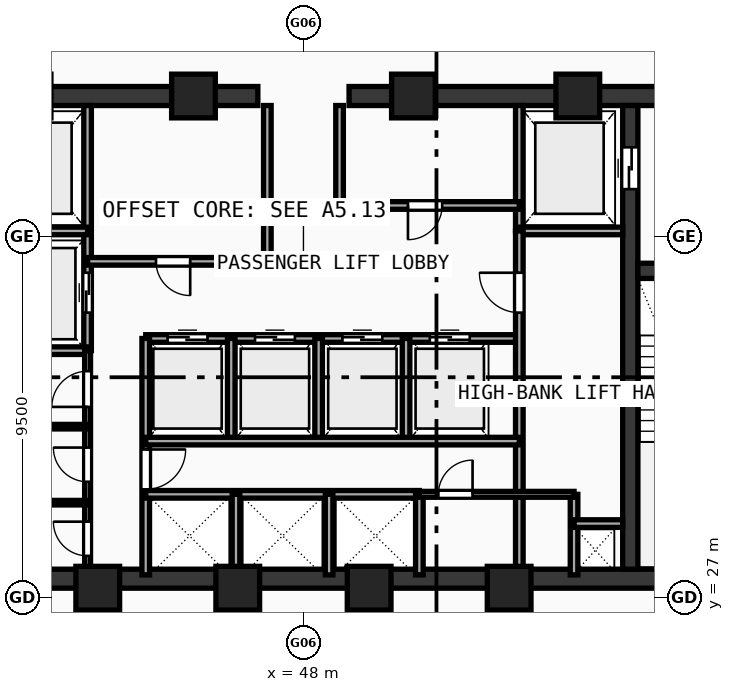
"""IFC4 building model, lengths in metres.
Left out: names, types, materials, properties, quantities, classifications, styles, units other than length and angle.
Written with IfcOpenShell. Run it as: python <this file> out.ifc"""

import sys

from ifc_helpers import new_model, si_unit, direction, frame, frame_2d, origin, origin_with_axes, origin_2d, place, context, subcontext, project, spatial, rectangle, hollow_rectangle, extrude, source, transform, mapped, element, fill, save


model = new_model("IFC4")
c1 = context("Model", 3, precision=1e-05, world=origin(), true_north=direction((0.0, 1.0)))
c2 = subcontext(c1, "Body", "Model", "MODEL_VIEW")
j1 = project(units=[si_unit("LENGTHUNIT", "METRE"), si_unit("PLANEANGLEUNIT", "RADIAN")], contexts=[c1])
p1 = place(None, origin())
s1 = spatial("IfcSite", under=j1, at=p1, CompositionType="ELEMENT")
p2 = place(p1, origin())
s2 = spatial("IfcBuilding", under=s1, at=p2, CompositionType="ELEMENT")
p3 = place(p2, frame((0.0, 0.0, 196.16)))
s3 = spatial("IfcBuildingStorey", under=s2, at=p3, CompositionType="ELEMENT", Elevation=196.16)
p4 = place(p3, frame((35.55, 27.5, 0.0), z_axis=(0.0, 0.0, 1.0), x_axis=(1.0, 0.0, 0.0)))
e1 = element("IfcWall", 1, at=p4, inside=s3, PredefinedType="SHEAR", context=c2, shape_type="SweptSolid", body=[
    extrude(rectangle(XDim=24.9, YDim=0.5, at=frame_2d((12.45, 0.0))), origin(), (0.0, 0.0, 1.0), 3.54),
])
p5 = place(p3, frame((35.55, 40.2, 0.0), z_axis=(0.0, 0.0, 1.0), x_axis=(1.0, 0.0, 0.0)))
e2 = element("IfcWall", 2, at=p5, inside=s3, PredefinedType="SHEAR", context=c2, shape_type="SweptSolid", body=[
    extrude(rectangle(XDim=11.25, YDim=0.5, at=frame_2d((5.625, 0.0))), origin(), (0.0, 0.0, 1.0), 3.54),
])
p6 = place(p5, frame((1.6, 0.0, 0.0)))
e3 = element("IfcOpeningElement", 3, at=p6, cuts=e2, PredefinedType="OPENING", context=c2, shape_type="SweptSolid", body=[
    extrude(rectangle(XDim=1.05, YDim=2.1, at=frame_2d((0.525, 1.05))), frame((0.0, 0.26, 0.0), z_axis=(0.0, -1.0, 0.0), x_axis=(1.0, 0.0, 0.0)), (0.0, 0.0, 1.0), 0.52),
])
p7 = place(p3, frame((49.2, 40.2, 0.0), z_axis=(0.0, 0.0, 1.0), x_axis=(1.0, 0.0, 0.0)))
e4 = element("IfcWall", 4, at=p7, inside=s3, PredefinedType="SHEAR", context=c2, shape_type="SweptSolid", body=[
    extrude(rectangle(XDim=11.25, YDim=0.5, at=frame_2d((5.625, 0.0))), origin(), (0.0, 0.0, 1.0), 3.54),
])
p8 = place(p7, frame((8.6, 0.0, 0.0)))
e5 = element("IfcOpeningElement", 5, at=p8, cuts=e4, PredefinedType="OPENING", context=c2, shape_type="SweptSolid", body=[
    extrude(rectangle(XDim=1.05, YDim=2.1, at=frame_2d((0.525, 1.05))), frame((0.0, 0.26, 0.0), z_axis=(0.0, -1.0, 0.0), x_axis=(1.0, 0.0, 0.0)), (0.0, 0.0, 1.0), 0.52),
])
p9 = place(p3, frame((56.6, 27.75, 0.0), z_axis=(0.0, 0.0, 1.0), x_axis=(0.0, 1.0, 0.0)))
e6 = element("IfcWall", 6, at=p9, inside=s3, PredefinedType="SHEAR", context=c2, shape_type="SweptSolid", body=[
    extrude(rectangle(XDim=12.2, YDim=0.4, at=frame_2d((6.1, 0.0))), origin(), (0.0, 0.0, 1.0), 3.54),
])
p10 = place(p9, frame((10.0, 0.0, 0.0)))
e7 = element("IfcOpeningElement", 7, at=p10, cuts=e6, PredefinedType="OPENING", context=c2, shape_type="SweptSolid", body=[
    extrude(rectangle(XDim=1.1, YDim=2.1, at=frame_2d((0.55, 1.05))), frame((0.0, 0.21, 0.0), z_axis=(0.0, -1.0, 0.0), x_axis=(1.0, 0.0, 0.0)), (0.0, 0.0, 1.0), 0.42),
])
p11 = place(p3, frame((56.8, 35.6, 0.0), z_axis=(0.0, 0.0, 1.0), x_axis=(1.0, 0.0, 0.0)))
e8 = element("IfcWall", 8, at=p11, inside=s3, PredefinedType="SHEAR", context=c2, shape_type="SweptSolid", body=[
    extrude(rectangle(XDim=3.15, YDim=0.4, at=frame_2d((1.575, 0.0))), origin(), (0.0, 0.0, 1.0), 3.54),
])
p12 = place(p11, frame((1.02, 0.0, 0.0)))
e9 = element("IfcOpeningElement", 9, at=p12, cuts=e8, PredefinedType="OPENING", context=c2, shape_type="SweptSolid", body=[
    extrude(rectangle(XDim=1.05, YDim=2.1, at=frame_2d((0.525, 1.05))), frame((0.0, 0.21, 0.0), z_axis=(0.0, -1.0, 0.0), x_axis=(1.0, 0.0, 0.0)), (0.0, 0.0, 1.0), 0.42),
])
m1 = source(origin(), c2, "Body", "SweptSolid", [
    extrude(hollow_rectangle(XDim=1.15, YDim=1.15, WallThickness=0.048, at=origin_2d()), origin(), (0.0, 0.0, 1.0), 3.8),
])
for number, where, z_axis, x_axis in (
    (10, (42.588, 27.25, -0.26), (0.0, 0.0, 1.0), (1.0, 0.0, 0.0)),
    (11, (46.272, 27.25, -0.26), (0.0, 0.0, 1.0), (1.0, 0.0, 0.0)),
    (12, (49.729, 27.25, -0.26), (0.0, 0.0, 1.0), (1.0, 0.0, 0.0)),
    (13, (53.412, 27.25, -0.26), (0.0, 0.0, 1.0), (1.0, 0.0, 0.0)),
    (14, (55.219, 40.2, -0.26), (0.0, 0.0, 1.0), (1.0, 0.0, 0.0)),
    (15, (50.894, 40.2, -0.26), (0.0, 0.0, 1.0), (1.0, 0.0, 0.0)),
    (16, (45.106, 40.2, -0.26), (0.0, 0.0, 1.0), (1.0, 0.0, 0.0)),
):
    element("IfcColumn", number, at=place(p3, frame(where, z_axis=z_axis, x_axis=x_axis)), inside=s3, PredefinedType="COLUMN", context=c2, shape_type="MappedRepresentation", body=[
        mapped(m1, transform((0.0, 0.0, 0.0), scale=1.0)),
    ])
p13 = place(p3, frame((42.32, 33.5, 0.0), z_axis=(0.0, 0.0, 1.0), x_axis=(0.0, 1.0, 0.0)))
e17 = element("IfcWall", 17, at=p13, inside=s3, PredefinedType="SOLIDWALL", context=c2, shape_type="SweptSolid", body=[
    extrude(rectangle(XDim=6.45, YDim=0.2, at=frame_2d((3.225, 0.0))), origin(), (0.0, 0.0, 1.0), 3.54),
])
p14 = place(p13, frame((1.0, 0.0, 0.0)))
e18 = element("IfcOpeningElement", 18, at=p14, cuts=e17, PredefinedType="OPENING", context=c2, shape_type="SweptSolid", body=[
    extrude(rectangle(XDim=1.05, YDim=2.1, at=frame_2d((0.525, 1.05))), frame((0.0, 0.11, 0.0), z_axis=(0.0, -1.0, 0.0), x_axis=(1.0, 0.0, 0.0)), (0.0, 0.0, 1.0), 0.22),
])
for number, where, z_axis, x_axis in (
    (19, (39.6, 36.65, 0.0), (0.0, 0.0, 1.0), (1.0, 0.0, 0.0)),
    (20, (39.6, 33.5, 0.0), (0.0, 0.0, 1.0), (1.0, 0.0, 0.0)),
):
    element("IfcWall", number, at=place(p3, frame(where, z_axis=z_axis, x_axis=x_axis)), inside=s3, PredefinedType="SOLIDWALL", context=c2, shape_type="SweptSolid", body=[
        extrude(rectangle(XDim=2.72, YDim=0.2, at=frame_2d((1.36, 0.0))), origin(), (0.0, 0.0, 1.0), 3.54),
    ])
p15 = place(p3, frame((53.68, 36.65, 0.0), z_axis=(0.0, 0.0, 1.0), x_axis=(0.0, 1.0, 0.0)))
e21 = element("IfcWall", 21, at=p15, inside=s3, PredefinedType="SOLIDWALL", context=c2, shape_type="SweptSolid", body=[
    extrude(rectangle(XDim=3.3, YDim=0.2, at=frame_2d((1.65, 0.0))), origin(), (0.0, 0.0, 1.0), 3.54),
])
p16 = place(p3, frame((53.68, 36.65, 0.0), z_axis=(0.0, 0.0, 1.0), x_axis=(1.0, 0.0, 0.0)))
e22 = element("IfcWall", 22, at=p16, inside=s3, PredefinedType="SOLIDWALL", context=c2, shape_type="SweptSolid", body=[
    extrude(rectangle(XDim=2.72, YDim=0.2, at=frame_2d((1.36, 0.0))), origin(), (0.0, 0.0, 1.0), 3.54),
])
p17 = place(p3, frame((42.32, 35.85, 0.0), z_axis=(0.0, 0.0, 1.0), x_axis=(1.0, 0.0, 0.0)))
e23 = element("IfcWall", 23, at=p17, inside=s3, PredefinedType="SOLIDWALL", context=c2, shape_type="SweptSolid", body=[
    extrude(rectangle(XDim=4.73, YDim=0.2, at=frame_2d((2.365, 0.0))), origin(), (0.0, 0.0, 1.0), 3.54),
])
p18 = place(p17, frame((1.8, 0.0, 0.0)))
e24 = element("IfcOpeningElement", 24, at=p18, cuts=e23, PredefinedType="OPENING", context=c2, shape_type="SweptSolid", body=[
    extrude(rectangle(XDim=0.9, YDim=2.1, at=frame_2d((0.45, 1.05))), frame((0.0, 0.11, 0.0), z_axis=(0.0, -1.0, 0.0), x_axis=(1.0, 0.0, 0.0)), (0.0, 0.0, 1.0), 0.22),
])
p19 = place(p3, frame((48.95, 37.32, 0.0), z_axis=(0.0, 0.0, 1.0), x_axis=(1.0, 0.0, 0.0)))
e25 = element("IfcWall", 25, at=p19, inside=s3, PredefinedType="SOLIDWALL", context=c2, shape_type="SweptSolid", body=[
    extrude(rectangle(XDim=4.73, YDim=0.2, at=frame_2d((2.365, 0.0))), origin(), (0.0, 0.0, 1.0), 3.54),
])
p20 = place(p19, frame((1.8, 0.0, 0.0)))
e26 = element("IfcOpeningElement", 26, at=p20, cuts=e25, PredefinedType="OPENING", context=c2, shape_type="SweptSolid", body=[
    extrude(rectangle(XDim=0.9, YDim=2.1, at=frame_2d((0.45, 1.05))), frame((0.0, 0.11, 0.0), z_axis=(0.0, -1.0, 0.0), x_axis=(1.0, 0.0, 0.0)), (0.0, 0.0, 1.0), 0.22),
])
p21 = place(p3, frame((47.05, 35.85, 0.0), z_axis=(0.0, 0.0, 1.0), x_axis=(0.0, 1.0, 0.0)))
e27 = element("IfcWall", 27, at=p21, inside=s3, PredefinedType="SOLIDWALL", context=c2, shape_type="SweptSolid", body=[
    extrude(rectangle(XDim=4.1, YDim=0.2, at=frame_2d((2.05, 0.0))), origin(), (0.0, 0.0, 1.0), 3.54),
])
p22 = place(p3, frame((48.95, 37.32, 0.0), z_axis=(0.0, 0.0, 1.0), x_axis=(0.0, 1.0, 0.0)))
e28 = element("IfcWall", 28, at=p22, inside=s3, PredefinedType="SOLIDWALL", context=c2, shape_type="SweptSolid", body=[
    extrude(rectangle(XDim=2.63, YDim=0.2, at=frame_2d((1.315, 0.0))), origin(), (0.0, 0.0, 1.0), 3.54),
])
p23 = place(p3, frame((43.85, 33.82, 0.0), z_axis=(0.0, 0.0, 1.0), x_axis=(1.0, 0.0, 0.0)))
e29 = element("IfcWall", 29, at=p23, inside=s3, PredefinedType="SOLIDWALL", context=c2, shape_type="SweptSolid", body=[
    extrude(rectangle(XDim=9.83, YDim=0.2, at=frame_2d((4.915, 0.0))), origin(), (0.0, 0.0, 1.0), 3.54),
])
p24 = place(p23, frame((0.575, 0.0, 0.0)))
e30 = element("IfcOpeningElement", 30, at=p24, cuts=e29, PredefinedType="OPENING", context=c2, shape_type="SweptSolid", body=[
    extrude(rectangle(XDim=1.05, YDim=2.1, at=frame_2d((0.525, 1.05))), frame((0.0, 0.11, 0.0), z_axis=(0.0, -1.0, 0.0), x_axis=(1.0, 0.0, 0.0)), (0.0, 0.0, 1.0), 0.22),
])
p25 = place(p23, frame((2.875, 0.0, 0.0)))
e31 = element("IfcOpeningElement", 31, at=p25, cuts=e29, PredefinedType="OPENING", context=c2, shape_type="SweptSolid", body=[
    extrude(rectangle(XDim=1.05, YDim=2.1, at=frame_2d((0.525, 1.05))), frame((0.0, 0.11, 0.0), z_axis=(0.0, -1.0, 0.0), x_axis=(1.0, 0.0, 0.0)), (0.0, 0.0, 1.0), 0.22),
])
p26 = place(p23, frame((5.175, 0.0, 0.0)))
e32 = element("IfcOpeningElement", 32, at=p26, cuts=e29, PredefinedType="OPENING", context=c2, shape_type="SweptSolid", body=[
    extrude(rectangle(XDim=1.05, YDim=2.1, at=frame_2d((0.525, 1.05))), frame((0.0, 0.11, 0.0), z_axis=(0.0, -1.0, 0.0), x_axis=(1.0, 0.0, 0.0)), (0.0, 0.0, 1.0), 0.22),
])
p27 = place(p23, frame((7.475, 0.0, 0.0)))
e33 = element("IfcOpeningElement", 33, at=p27, cuts=e29, PredefinedType="OPENING", context=c2, shape_type="SweptSolid", body=[
    extrude(rectangle(XDim=1.05, YDim=2.1, at=frame_2d((0.525, 1.05))), frame((0.0, 0.11, 0.0), z_axis=(0.0, -1.0, 0.0), x_axis=(1.0, 0.0, 0.0)), (0.0, 0.0, 1.0), 0.22),
])
p28 = place(p3, frame((43.85, 27.6, 0.0), z_axis=(0.0, 0.0, 1.0), x_axis=(0.0, 1.0, 0.0)))
e34 = element("IfcWall", 34, at=p28, inside=s3, PredefinedType="SOLIDWALL", context=c2, shape_type="SweptSolid", body=[
    extrude(rectangle(XDim=6.22, YDim=0.2, at=frame_2d((3.11, 0.0))), origin(), (0.0, 0.0, 1.0), 3.54),
])
p29 = place(p28, frame((2.25, 0.0, 0.0)))
e35 = element("IfcOpeningElement", 35, at=p29, cuts=e34, PredefinedType="OPENING", context=c2, shape_type="SweptSolid", body=[
    extrude(rectangle(XDim=1.05, YDim=2.1, at=frame_2d((0.525, 1.05))), frame((0.0, 0.11, 0.0), z_axis=(0.0, -1.0, 0.0), x_axis=(1.0, 0.0, 0.0)), (0.0, 0.0, 1.0), 0.22),
])
p30 = place(p3, frame((53.68, 27.6, 0.0), z_axis=(0.0, 0.0, 1.0), x_axis=(0.0, 1.0, 0.0)))
e36 = element("IfcWall", 36, at=p30, inside=s3, PredefinedType="SOLIDWALL", context=c2, shape_type="SweptSolid", body=[
    extrude(rectangle(XDim=9.05, YDim=0.2, at=frame_2d((4.525, 0.0))), origin(), (0.0, 0.0, 1.0), 3.54),
])
p31 = place(p30, frame((6.9, 0.0, 0.0)))
e37 = element("IfcOpeningElement", 37, at=p31, cuts=e36, PredefinedType="OPENING", context=c2, shape_type="SweptSolid", body=[
    extrude(rectangle(XDim=1.05, YDim=2.1, at=frame_2d((0.525, 1.05))), frame((0.0, 0.11, 0.0), z_axis=(0.0, -1.0, 0.0), x_axis=(1.0, 0.0, 0.0)), (0.0, 0.0, 1.0), 0.22),
])
for number, where, z_axis, x_axis in (
    (38, (46.1, 31.12, 0.0), (0.0, 0.0, 1.0), (0.0, 1.0, 0.0)),
    (39, (48.4, 31.12, 0.0), (0.0, 0.0, 1.0), (0.0, 1.0, 0.0)),
    (40, (50.7, 31.12, 0.0), (0.0, 0.0, 1.0), (0.0, 1.0, 0.0)),
):
    element("IfcWall", number, at=place(p3, frame(where, z_axis=z_axis, x_axis=x_axis)), inside=s3, PredefinedType="SOLIDWALL", context=c2, shape_type="SweptSolid", body=[
        extrude(rectangle(XDim=2.7, YDim=0.2, at=frame_2d((1.35, 0.0))), origin(), (0.0, 0.0, 1.0), 3.54),
    ])
p32 = place(p3, frame((43.85, 29.72, 0.0), z_axis=(0.0, 0.0, 1.0), x_axis=(1.0, 0.0, 0.0)))
e41 = element("IfcWall", 41, at=p32, inside=s3, PredefinedType="SOLIDWALL", context=c2, shape_type="SweptSolid", body=[
    extrude(rectangle(XDim=7.2, YDim=0.2, at=frame_2d((3.6, 0.0))), origin(), (0.0, 0.0, 1.0), 3.54),
])
p33 = place(p3, frame((51.05, 27.6, 0.0), z_axis=(0.0, 0.0, 1.0), x_axis=(0.0, 1.0, 0.0)))
e42 = element("IfcWall", 42, at=p33, inside=s3, PredefinedType="SOLIDWALL", context=c2, shape_type="SweptSolid", body=[
    extrude(rectangle(XDim=2.12, YDim=0.2, at=frame_2d((1.06, 0.0))), origin(), (0.0, 0.0, 1.0), 3.54),
])
p34 = place(p3, frame((43.85, 31.12, 0.0), z_axis=(0.0, 0.0, 1.0), x_axis=(1.0, 0.0, 0.0)))
e43 = element("IfcWall", 43, at=p34, inside=s3, PredefinedType="SOLIDWALL", context=c2, shape_type="SweptSolid", body=[
    extrude(rectangle(XDim=9.83, YDim=0.2, at=frame_2d((4.915, 0.0))), origin(), (0.0, 0.0, 1.0), 3.54),
])
for number, where, z_axis, x_axis in (
    (44, (46.225, 27.6, 0.0), (0.0, 0.0, 1.0), (0.0, 1.0, 0.0)),
    (45, (48.675, 27.6, 0.0), (0.0, 0.0, 1.0), (0.0, 1.0, 0.0)),
    (46, (55.12, 27.6, 0.0), (0.0, 0.0, 1.0), (0.0, 1.0, 0.0)),
):
    element("IfcWall", number, at=place(p3, frame(where, z_axis=z_axis, x_axis=x_axis)), inside=s3, PredefinedType="SOLIDWALL", context=c2, shape_type="SweptSolid", body=[
        extrude(rectangle(XDim=2.12, YDim=0.2, at=frame_2d((1.06, 0.0))), origin(), (0.0, 0.0, 1.0), 3.54),
    ])
p35 = place(p3, frame((55.12, 28.95, 0.0), z_axis=(0.0, 0.0, 1.0), x_axis=(1.0, 0.0, 0.0)))
e47 = element("IfcWall", 47, at=p35, inside=s3, PredefinedType="SOLIDWALL", context=c2, shape_type="SweptSolid", body=[
    extrude(rectangle(XDim=1.28, YDim=0.2, at=frame_2d((0.64, 0.0))), origin(), (0.0, 0.0, 1.0), 3.54),
])
p36 = place(p3, frame((42.32, 27.6, 0.0), z_axis=(0.0, 0.0, 1.0), x_axis=(0.0, 1.0, 0.0)))
e48 = element("IfcWall", 48, at=p36, inside=s3, PredefinedType="PARTITIONING", context=c2, shape_type="SweptSolid", body=[
    extrude(rectangle(XDim=5.9, YDim=0.155, at=frame_2d((2.95, 0.0))), origin(), (0.0, 0.0, 1.0), 3.54),
])
p37 = place(p36, frame((0.5, 0.0, 0.0)))
e49 = element("IfcOpeningElement", 49, at=p37, cuts=e48, PredefinedType="OPENING", context=c2, shape_type="SweptSolid", body=[
    extrude(rectangle(XDim=0.9, YDim=2.1, at=frame_2d((0.45, 1.05))), frame((0.0, 0.087, 0.0), z_axis=(0.0, -1.0, 0.0), x_axis=(1.0, 0.0, 0.0)), (0.0, 0.0, 1.0), 0.175),
])
p38 = place(p36, frame((2.45, 0.0, 0.0)))
e50 = element("IfcOpeningElement", 50, at=p38, cuts=e48, PredefinedType="OPENING", context=c2, shape_type="SweptSolid", body=[
    extrude(rectangle(XDim=0.9, YDim=2.1, at=frame_2d((0.45, 1.05))), frame((0.0, 0.087, 0.0), z_axis=(0.0, -1.0, 0.0), x_axis=(1.0, 0.0, 0.0)), (0.0, 0.0, 1.0), 0.175),
])
p39 = place(p36, frame((4.42, 0.0, 0.0)))
e51 = element("IfcOpeningElement", 51, at=p39, cuts=e48, PredefinedType="OPENING", context=c2, shape_type="SweptSolid", body=[
    extrude(rectangle(XDim=0.94, YDim=2.1, at=frame_2d((0.47, 1.05))), frame((0.0, 0.087, 0.0), z_axis=(0.0, -1.0, 0.0), x_axis=(1.0, 0.0, 0.0)), (0.0, 0.0, 1.0), 0.175),
])
p40 = place(p3, frame((51.05, 29.72, 0.0), z_axis=(0.0, 0.0, 1.0), x_axis=(1.0, 0.0, 0.0)))
e52 = element("IfcWall", 52, at=p40, inside=s3, PredefinedType="PARTITIONING", context=c2, shape_type="SweptSolid", body=[
    extrude(rectangle(XDim=4.07, YDim=0.155, at=frame_2d((2.035, 0.0))), origin(), (0.0, 0.0, 1.0), 3.54),
])
p41 = place(p40, frame((0.5, 0.0, 0.0)))
e53 = element("IfcOpeningElement", 53, at=p41, cuts=e52, PredefinedType="OPENING", context=c2, shape_type="SweptSolid", body=[
    extrude(rectangle(XDim=0.9, YDim=2.1, at=frame_2d((0.45, 1.05))), frame((0.0, 0.087, 0.0), z_axis=(0.0, -1.0, 0.0), x_axis=(1.0, 0.0, 0.0)), (0.0, 0.0, 1.0), 0.175),
])
for number, where, z_axis, x_axis in (
    (54, (39.6, 29.5, 0.0), (0.0, 0.0, 1.0), (1.0, 0.0, 0.0)),
    (55, (39.6, 31.5, 0.0), (0.0, 0.0, 1.0), (1.0, 0.0, 0.0)),
):
    element("IfcWall", number, at=place(p3, frame(where, z_axis=z_axis, x_axis=x_axis)), inside=s3, PredefinedType="PARTITIONING", context=c2, shape_type="SweptSolid", body=[
        extrude(rectangle(XDim=2.72, YDim=0.12, at=frame_2d((1.36, 0.0))), origin(), (0.0, 0.0, 1.0), 3.54),
    ])
m2 = source(origin(), c2, "Body", "SweptSolid", [
    extrude(rectangle(XDim=1.1, YDim=2.1, at=frame_2d((0.55, 1.05))), frame((0.0, 0.025, 0.0), z_axis=(0.0, -1.0, 0.0), x_axis=(1.0, 0.0, 0.0)), (0.0, 0.0, 1.0), 0.05),
])
p42 = place(p10, origin_with_axes())
e56 = element("IfcDoor", 56, at=p42, inside=s3, OperationType="DOUBLE_DOOR_SLIDING", PredefinedType="DOOR", context=c2, shape_type="MappedRepresentation", body=[
    mapped(m2, transform((0.0, 0.0, 0.0), scale=1.0)),
])
fill(e7, e56)
m3 = source(origin(), c2, "Body", "SweptSolid", [
    extrude(rectangle(XDim=1.05, YDim=2.1, at=frame_2d((0.525, 1.05))), frame((0.0, 0.025, 0.0), z_axis=(0.0, -1.0, 0.0), x_axis=(1.0, 0.0, 0.0)), (0.0, 0.0, 1.0), 0.05),
])
p43 = place(p14, origin_with_axes())
e57 = element("IfcDoor", 57, at=p43, inside=s3, OperationType="DOUBLE_DOOR_SLIDING", PredefinedType="DOOR", context=c2, shape_type="MappedRepresentation", body=[
    mapped(m3, transform((0.0, 0.0, 0.0), scale=1.0)),
])
fill(e18, e57)
m4 = source(origin(), c2, "Body", "SweptSolid", [
    extrude(rectangle(XDim=0.9, YDim=2.1, at=frame_2d((0.45, 1.05))), frame((0.0, 0.025, 0.0), z_axis=(0.0, -1.0, 0.0), x_axis=(1.0, 0.0, 0.0)), (0.0, 0.0, 1.0), 0.05),
])
p44 = place(p18, frame((0.9, 0.0, 0.0), z_axis=(0.0, 0.0, 1.0), x_axis=(-1.0, 0.0, 0.0)))
e58 = element("IfcDoor", 58, at=p44, inside=s3, OperationType="SINGLE_SWING_LEFT", PredefinedType="DOOR", context=c2, shape_type="MappedRepresentation", body=[
    mapped(m4, transform((0.0, 0.0, 0.0), scale=1.0)),
])
fill(e24, e58)
p45 = place(p20, frame((0.9, 0.0, 0.0), z_axis=(0.0, 0.0, 1.0), x_axis=(-1.0, 0.0, 0.0)))
e59 = element("IfcDoor", 59, at=p45, inside=s3, OperationType="SINGLE_SWING_RIGHT", PredefinedType="DOOR", context=c2, shape_type="MappedRepresentation", body=[
    mapped(m4, transform((0.0, 0.0, 0.0), scale=1.0)),
])
fill(e26, e59)
p46 = place(p24, origin_with_axes())
e60 = element("IfcDoor", 60, at=p46, inside=s3, OperationType="DOUBLE_DOOR_SLIDING", PredefinedType="DOOR", context=c2, shape_type="MappedRepresentation", body=[
    mapped(m3, transform((0.0, 0.0, 0.0), scale=1.0)),
])
fill(e30, e60)
p47 = place(p25, origin_with_axes())
e61 = element("IfcDoor", 61, at=p47, inside=s3, OperationType="DOUBLE_DOOR_SLIDING", PredefinedType="DOOR", context=c2, shape_type="MappedRepresentation", body=[
    mapped(m3, transform((0.0, 0.0, 0.0), scale=1.0)),
])
fill(e31, e61)
p48 = place(p26, origin_with_axes())
e62 = element("IfcDoor", 62, at=p48, inside=s3, OperationType="DOUBLE_DOOR_SLIDING", PredefinedType="DOOR", context=c2, shape_type="MappedRepresentation", body=[
    mapped(m3, transform((0.0, 0.0, 0.0), scale=1.0)),
])
fill(e32, e62)
p49 = place(p27, origin_with_axes())
e63 = element("IfcDoor", 63, at=p49, inside=s3, OperationType="DOUBLE_DOOR_SLIDING", PredefinedType="DOOR", context=c2, shape_type="MappedRepresentation", body=[
    mapped(m3, transform((0.0, 0.0, 0.0), scale=1.0)),
])
fill(e33, e63)
p50 = place(p29, frame((1.05, 0.0, 0.0), z_axis=(0.0, 0.0, 1.0), x_axis=(-1.0, 0.0, 0.0)))
e64 = element("IfcDoor", 64, at=p50, inside=s3, OperationType="SINGLE_SWING_LEFT", PredefinedType="DOOR", context=c2, shape_type="MappedRepresentation", body=[
    mapped(m3, transform((0.0, 0.0, 0.0), scale=1.0)),
])
fill(e35, e64)
p51 = place(p31, origin_with_axes())
e65 = element("IfcDoor", 65, at=p51, inside=s3, OperationType="SINGLE_SWING_RIGHT", PredefinedType="DOOR", context=c2, shape_type="MappedRepresentation", body=[
    mapped(m3, transform((0.0, 0.0, 0.0), scale=1.0)),
])
fill(e37, e65)
p52 = place(p37, origin_with_axes())
e66 = element("IfcDoor", 66, at=p52, inside=s3, OperationType="SINGLE_SWING_RIGHT", PredefinedType="DOOR", context=c2, shape_type="MappedRepresentation", body=[
    mapped(m4, transform((0.0, 0.0, 0.0), scale=1.0)),
])
fill(e49, e66)
p53 = place(p38, origin_with_axes())
e67 = element("IfcDoor", 67, at=p53, inside=s3, OperationType="SINGLE_SWING_RIGHT", PredefinedType="DOOR", context=c2, shape_type="MappedRepresentation", body=[
    mapped(m4, transform((0.0, 0.0, 0.0), scale=1.0)),
])
fill(e50, e67)
m5 = source(origin(), c2, "Body", "SweptSolid", [
    extrude(rectangle(XDim=0.94, YDim=2.1, at=frame_2d((0.47, 1.05))), frame((0.0, 0.025, 0.0), z_axis=(0.0, -1.0, 0.0), x_axis=(1.0, 0.0, 0.0)), (0.0, 0.0, 1.0), 0.05),
])
p54 = place(p39, origin_with_axes())
e68 = element("IfcDoor", 68, at=p54, inside=s3, OperationType="SINGLE_SWING_LEFT", PredefinedType="DOOR", context=c2, shape_type="MappedRepresentation", body=[
    mapped(m5, transform((0.0, 0.0, 0.0), scale=1.0)),
])
fill(e51, e68)
p55 = place(p41, origin_with_axes())
e69 = element("IfcDoor", 69, at=p55, inside=s3, OperationType="SINGLE_SWING_RIGHT", PredefinedType="DOOR", context=c2, shape_type="MappedRepresentation", body=[
    mapped(m4, transform((0.0, 0.0, 0.0), scale=1.0)),
])
fill(e53, e69)
save(model, sys.argv[1])
